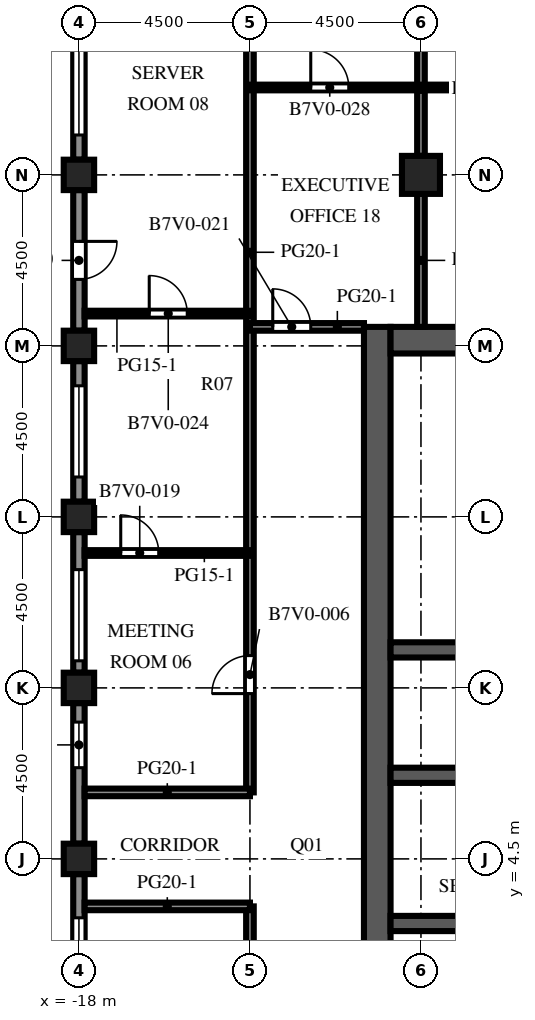
"""IFC4 building model, lengths in metres.
Left out: names, types, materials, properties, quantities, classifications, styles, units other than length and angle.
Written with IfcOpenShell. Run it as: python <this file> out.ifc"""

import sys

from ifc_helpers import new_model, si_unit, direction, frame, frame_2d, origin, origin_2d, place, context, subcontext, project, spatial, rectangle, extrude, element, fill, save


model = new_model("IFC4")
c1 = context("Model", 3, precision=1e-05, world=origin(), true_north=direction((0.0, 1.0)))
c2 = subcontext(c1, "Body", "Model", "MODEL_VIEW")
j1 = project(units=[si_unit("LENGTHUNIT", "METRE"), si_unit("PLANEANGLEUNIT", "RADIAN")], contexts=[c1])
p1 = place(None, origin())
s1 = spatial("IfcSite", under=j1, at=p1, CompositionType="ELEMENT")
p2 = place(p1, origin())
s2 = spatial("IfcBuilding", under=s1, at=p2, CompositionType="ELEMENT")
p3 = place(p2, frame((0.0, 0.0, 239.8)))
s3 = spatial("IfcBuildingStorey", under=s2, at=p3, CompositionType="ELEMENT", Elevation=239.8)
for number, where, z_axis, x_axis in (
    (1, (-18.0, 4.5, 0.0), (0.0, 0.0, 1.0), (1.0, 0.0, 0.0)),
    (2, (-18.0, 9.0, 0.0), (0.0, 0.0, 1.0), (1.0, 0.0, 0.0)),
    (3, (-18.0, 13.5, 0.0), (0.0, 0.0, 1.0), (1.0, 0.0, 0.0)),
    (4, (-18.0, 18.0, 0.0), (0.0, 0.0, 1.0), (1.0, 0.0, 0.0)),
    (5, (-18.0, 22.5, 0.0), (0.0, 0.0, 1.0), (1.0, 0.0, 0.0)),
):
    element("IfcColumn", number, at=place(p3, frame(where, z_axis=z_axis, x_axis=x_axis)), inside=s3, PredefinedType="COLUMN", context=c2, shape_type="SweptSolid", body=[
        extrude(rectangle(XDim=0.8, YDim=0.8, at=origin_2d()), origin(), (0.0, 0.0, 1.0), 4.1),
    ])
p4 = place(p3, frame((-9.0, 22.5, 0.0), z_axis=(0.0, 0.0, 1.0), x_axis=(1.0, 0.0, 0.0)))
e6 = element("IfcColumn", 6, at=p4, inside=s3, PredefinedType="COLUMN", context=c2, shape_type="SweptSolid", body=[
    extrude(rectangle(XDim=1.0, YDim=1.0, at=origin_2d()), origin(), (0.0, 0.0, 1.0), 4.1),
])
p5 = place(p3, frame((-10.15, -9.0, 0.0), z_axis=(0.0, 0.0, 1.0), x_axis=(0.0, 1.0, 0.0)))
e7 = element("IfcWall", 7, at=p5, inside=s3, PredefinedType="SHEAR", context=c2, shape_type="SweptSolid", body=[
    extrude(rectangle(XDim=27.5, YDim=0.7, at=frame_2d((13.75, 0.0))), origin(), (0.0, 0.0, 1.0), 4.1),
])
p6 = place(p5, frame((12.55, 0.0, 0.0)))
e8 = element("IfcOpeningElement", 8, at=p6, cuts=e7, PredefinedType="OPENING", context=c2, shape_type="SweptSolid", body=[
    extrude(rectangle(XDim=2.4, YDim=2.4, at=frame_2d((1.2, 1.2))), frame((0.0, 0.36, 0.0), z_axis=(0.0, -1.0, 0.0), x_axis=(1.0, 0.0, 0.0)), (0.0, 0.0, 1.0), 0.72),
])
p7 = place(p5, frame((6.825, 0.0, 0.0)))
e9 = element("IfcOpeningElement", 9, at=p7, cuts=e7, PredefinedType="OPENING", context=c2, shape_type="SweptSolid", body=[
    extrude(rectangle(XDim=1.2, YDim=2.1, at=frame_2d((0.6, 1.05))), frame((0.0, 0.36, 0.0), z_axis=(0.0, -1.0, 0.0), x_axis=(1.0, 0.0, 0.0)), (0.0, 0.0, 1.0), 0.72),
])
p8 = place(p5, frame((19.475, 0.0, 0.0)))
e10 = element("IfcOpeningElement", 10, at=p8, cuts=e7, PredefinedType="OPENING", context=c2, shape_type="SweptSolid", body=[
    extrude(rectangle(XDim=1.2, YDim=2.1, at=frame_2d((0.6, 1.05))), frame((0.0, 0.36, 0.0), z_axis=(0.0, -1.0, 0.0), x_axis=(1.0, 0.0, 0.0)), (0.0, 0.0, 1.0), 0.72),
])
p9 = place(p3, frame((-9.8, 18.15, 0.0), z_axis=(0.0, 0.0, 1.0), x_axis=(1.0, 0.0, 0.0)))
e11 = element("IfcWall", 11, at=p9, inside=s3, PredefinedType="SHEAR", context=c2, shape_type="SweptSolid", body=[
    extrude(rectangle(XDim=10.6, YDim=0.7, at=frame_2d((5.3, 0.0))), origin(), (0.0, 0.0, 1.0), 4.1),
])
p10 = place(p3, frame((-9.8, 2.8, 0.0), z_axis=(0.0, 0.0, 1.0), x_axis=(1.0, 0.0, 0.0)))
e12 = element("IfcWall", 12, at=p10, inside=s3, PredefinedType="SHEAR", context=c2, shape_type="SweptSolid", body=[
    extrude(rectangle(XDim=10.6, YDim=0.4, at=frame_2d((5.3, 0.0))), origin(), (0.0, 0.0, 1.0), 4.1),
])
p11 = place(p10, frame((0.688, 0.0, 0.0)))
e13 = element("IfcOpeningElement", 13, at=p11, cuts=e12, PredefinedType="OPENING", context=c2, shape_type="SweptSolid", body=[
    extrude(rectangle(XDim=1.1, YDim=2.1, at=frame_2d((0.55, 1.05))), frame((0.0, 0.21, 0.0), z_axis=(0.0, -1.0, 0.0), x_axis=(1.0, 0.0, 0.0)), (0.0, 0.0, 1.0), 0.42),
])
p12 = place(p10, frame((3.438, 0.0, 0.0)))
e14 = element("IfcOpeningElement", 14, at=p12, cuts=e12, PredefinedType="OPENING", context=c2, shape_type="SweptSolid", body=[
    extrude(rectangle(XDim=1.1, YDim=2.1, at=frame_2d((0.55, 1.05))), frame((0.0, 0.21, 0.0), z_axis=(0.0, -1.0, 0.0), x_axis=(1.0, 0.0, 0.0)), (0.0, 0.0, 1.0), 0.42),
])
p13 = place(p10, frame((6.113, 0.0, 0.0)))
e15 = element("IfcOpeningElement", 15, at=p13, cuts=e12, PredefinedType="OPENING", context=c2, shape_type="SweptSolid", body=[
    extrude(rectangle(XDim=1.0, YDim=2.1, at=frame_2d((0.5, 1.05))), frame((0.0, 0.21, 0.0), z_axis=(0.0, -1.0, 0.0), x_axis=(1.0, 0.0, 0.0)), (0.0, 0.0, 1.0), 0.42),
])
p14 = place(p10, frame((8.863, 0.0, 0.0)))
e16 = element("IfcOpeningElement", 16, at=p14, cuts=e12, PredefinedType="OPENING", context=c2, shape_type="SweptSolid", body=[
    extrude(rectangle(XDim=1.0, YDim=2.1, at=frame_2d((0.5, 1.05))), frame((0.0, 0.21, 0.0), z_axis=(0.0, -1.0, 0.0), x_axis=(1.0, 0.0, 0.0)), (0.0, 0.0, 1.0), 0.42),
])
p15 = place(p3, frame((-9.8, 6.7, 0.0), z_axis=(0.0, 0.0, 1.0), x_axis=(1.0, 0.0, 0.0)))
e17 = element("IfcWall", 17, at=p15, inside=s3, PredefinedType="SHEAR", context=c2, shape_type="SweptSolid", body=[
    extrude(rectangle(XDim=10.6, YDim=0.4, at=frame_2d((5.3, 0.0))), origin(), (0.0, 0.0, 1.0), 4.1),
])
p16 = place(p15, frame((3.438, 0.0, 0.0)))
e18 = element("IfcOpeningElement", 18, at=p16, cuts=e17, PredefinedType="OPENING", context=c2, shape_type="SweptSolid", body=[
    extrude(rectangle(XDim=1.1, YDim=2.1, at=frame_2d((0.55, 1.05))), frame((0.0, 0.21, 0.0), z_axis=(0.0, -1.0, 0.0), x_axis=(1.0, 0.0, 0.0)), (0.0, 0.0, 1.0), 0.42),
])
p17 = place(p15, frame((6.062, 0.0, 0.0)))
e19 = element("IfcOpeningElement", 19, at=p17, cuts=e17, PredefinedType="OPENING", context=c2, shape_type="SweptSolid", body=[
    extrude(rectangle(XDim=1.1, YDim=2.1, at=frame_2d((0.55, 1.05))), frame((0.0, 0.21, 0.0), z_axis=(0.0, -1.0, 0.0), x_axis=(1.0, 0.0, 0.0)), (0.0, 0.0, 1.0), 0.42),
])
p18 = place(p15, frame((8.812, 0.0, 0.0)))
e20 = element("IfcOpeningElement", 20, at=p18, cuts=e17, PredefinedType="OPENING", context=c2, shape_type="SweptSolid", body=[
    extrude(rectangle(XDim=1.1, YDim=2.1, at=frame_2d((0.55, 1.05))), frame((0.0, 0.21, 0.0), z_axis=(0.0, -1.0, 0.0), x_axis=(1.0, 0.0, 0.0)), (0.0, 0.0, 1.0), 0.42),
])
p19 = place(p15, frame((0.738, 0.0, 0.0)))
e21 = element("IfcOpeningElement", 21, at=p19, cuts=e17, PredefinedType="OPENING", context=c2, shape_type="SweptSolid", body=[
    extrude(rectangle(XDim=1.0, YDim=2.1, at=frame_2d((0.5, 1.05))), frame((0.0, 0.21, 0.0), z_axis=(0.0, -1.0, 0.0), x_axis=(1.0, 0.0, 0.0)), (0.0, 0.0, 1.0), 0.42),
])
p20 = place(p3, frame((-9.8, 10.0, 0.0), z_axis=(0.0, 0.0, 1.0), x_axis=(1.0, 0.0, 0.0)))
e22 = element("IfcWall", 22, at=p20, inside=s3, PredefinedType="SHEAR", context=c2, shape_type="SweptSolid", body=[
    extrude(rectangle(XDim=10.6, YDim=0.4, at=frame_2d((5.3, 0.0))), origin(), (0.0, 0.0, 1.0), 4.1),
])
p21 = place(p3, frame((-18.0, 22.9, 0.0), z_axis=(0.0, 0.0, 1.0), x_axis=(0.0, 1.0, 0.0)))
e23 = element("IfcWall", 23, at=p21, inside=s3, PredefinedType="SOLIDWALL", context=c2, shape_type="SweptSolid", body=[
    extrude(rectangle(XDim=3.7, YDim=0.3, at=frame_2d((1.85, 0.0))), origin(), (0.0, 0.0, 1.0), 2.85),
])
p22 = place(p21, frame((0.65, 0.0, 0.8)))
e24 = element("IfcOpeningElement", 24, at=p22, cuts=e23, PredefinedType="OPENING", context=c2, shape_type="SweptSolid", body=[
    extrude(rectangle(XDim=2.4, YDim=1.7, at=frame_2d((1.2, 0.85))), frame((0.0, 0.16, 0.0), z_axis=(0.0, -1.0, 0.0), x_axis=(1.0, 0.0, 0.0)), (0.0, 0.0, 1.0), 0.32),
])
p23 = place(p3, frame((-18.0, 18.4, 0.0), z_axis=(0.0, 0.0, 1.0), x_axis=(0.0, 1.0, 0.0)))
e25 = element("IfcWall", 25, at=p23, inside=s3, PredefinedType="SOLIDWALL", context=c2, shape_type="SweptSolid", body=[
    extrude(rectangle(XDim=3.7, YDim=0.3, at=frame_2d((1.85, 0.0))), origin(), (0.0, 0.0, 1.0), 2.85),
])
p24 = place(p23, frame((1.35, 0.0, 0.0)))
e26 = element("IfcOpeningElement", 26, at=p24, cuts=e25, PredefinedType="OPENING", context=c2, shape_type="SweptSolid", body=[
    extrude(rectangle(XDim=1.0, YDim=2.2, at=frame_2d((0.5, 1.1))), frame((0.0, 0.16, 0.0), z_axis=(0.0, -1.0, 0.0), x_axis=(1.0, 0.0, 0.0)), (0.0, 0.0, 1.0), 0.32),
])
p25 = place(p3, frame((-18.0, 13.9, 0.0), z_axis=(0.0, 0.0, 1.0), x_axis=(0.0, 1.0, 0.0)))
e27 = element("IfcWall", 27, at=p25, inside=s3, PredefinedType="SOLIDWALL", context=c2, shape_type="SweptSolid", body=[
    extrude(rectangle(XDim=3.7, YDim=0.3, at=frame_2d((1.85, 0.0))), origin(), (0.0, 0.0, 1.0), 2.85),
])
p26 = place(p25, frame((0.65, 0.0, 0.8)))
e28 = element("IfcOpeningElement", 28, at=p26, cuts=e27, PredefinedType="OPENING", context=c2, shape_type="SweptSolid", body=[
    extrude(rectangle(XDim=2.4, YDim=1.7, at=frame_2d((1.2, 0.85))), frame((0.0, 0.16, 0.0), z_axis=(0.0, -1.0, 0.0), x_axis=(1.0, 0.0, 0.0)), (0.0, 0.0, 1.0), 0.32),
])
p27 = place(p3, frame((-18.0, 9.4, 0.0), z_axis=(0.0, 0.0, 1.0), x_axis=(0.0, 1.0, 0.0)))
e29 = element("IfcWall", 29, at=p27, inside=s3, PredefinedType="SOLIDWALL", context=c2, shape_type="SweptSolid", body=[
    extrude(rectangle(XDim=3.7, YDim=0.3, at=frame_2d((1.85, 0.0))), origin(), (0.0, 0.0, 1.0), 2.85),
])
p28 = place(p27, frame((0.312, 0.0, 0.8)))
e30 = element("IfcOpeningElement", 30, at=p28, cuts=e29, PredefinedType="OPENING", context=c2, shape_type="SweptSolid", body=[
    extrude(rectangle(XDim=2.4, YDim=1.7, at=frame_2d((1.2, 0.85))), frame((0.0, 0.16, 0.0), z_axis=(0.0, -1.0, 0.0), x_axis=(1.0, 0.0, 0.0)), (0.0, 0.0, 1.0), 0.32),
])
p29 = place(p3, frame((-18.0, 4.9, 0.0), z_axis=(0.0, 0.0, 1.0), x_axis=(0.0, 1.0, 0.0)))
e31 = element("IfcWall", 31, at=p29, inside=s3, PredefinedType="SOLIDWALL", context=c2, shape_type="SweptSolid", body=[
    extrude(rectangle(XDim=3.7, YDim=0.3, at=frame_2d((1.85, 0.0))), origin(), (0.0, 0.0, 1.0), 2.85),
])
p30 = place(p29, frame((2.0, 0.0, 0.8)))
e32 = element("IfcOpeningElement", 32, at=p30, cuts=e31, PredefinedType="OPENING", context=c2, shape_type="SweptSolid", body=[
    extrude(rectangle(XDim=1.2, YDim=1.7, at=frame_2d((0.6, 0.85))), frame((0.0, 0.16, 0.0), z_axis=(0.0, -1.0, 0.0), x_axis=(1.0, 0.0, 0.0)), (0.0, 0.0, 1.0), 0.32),
])
p31 = place(p3, frame((-18.0, 0.4, 0.0), z_axis=(0.0, 0.0, 1.0), x_axis=(0.0, 1.0, 0.0)))
e33 = element("IfcWall", 33, at=p31, inside=s3, PredefinedType="SOLIDWALL", context=c2, shape_type="SweptSolid", body=[
    extrude(rectangle(XDim=3.7, YDim=0.3, at=frame_2d((1.85, 0.0))), origin(), (0.0, 0.0, 1.0), 2.85),
])
p32 = place(p31, frame((0.15, 0.0, 0.8)))
e34 = element("IfcOpeningElement", 34, at=p32, cuts=e33, PredefinedType="OPENING", context=c2, shape_type="SweptSolid", body=[
    extrude(rectangle(XDim=2.4, YDim=1.7, at=frame_2d((1.2, 0.85))), frame((0.0, 0.16, 0.0), z_axis=(0.0, -1.0, 0.0), x_axis=(1.0, 0.0, 0.0)), (0.0, 0.0, 1.0), 0.32),
])
p33 = place(p3, frame((-13.5, -22.077, 0.0), z_axis=(0.0, 0.0, 1.0), x_axis=(0.0, 1.0, 0.0)))
e35 = element("IfcWall", 35, at=p33, inside=s3, PredefinedType="PARTITIONING", context=c2, shape_type="SweptSolid", body=[
    extrude(rectangle(XDim=25.327, YDim=0.2, at=frame_2d((12.664, 0.0))), origin(), (0.0, 0.0, 1.0), 3.65),
])
p34 = place(p33, frame((22.627, 0.0, 0.0)))
e36 = element("IfcOpeningElement", 36, at=p34, cuts=e35, PredefinedType="OPENING", context=c2, shape_type="SweptSolid", body=[
    extrude(rectangle(XDim=1.0, YDim=2.1, at=frame_2d((0.5, 1.05))), frame((0.0, 0.11, 0.0), z_axis=(0.0, -1.0, 0.0), x_axis=(1.0, 0.0, 0.0)), (0.0, 0.0, 1.0), 0.22),
])
p35 = place(p3, frame((-13.5, 6.25, 0.0), z_axis=(0.0, 0.0, 1.0), x_axis=(0.0, 1.0, 0.0)))
e37 = element("IfcWall", 37, at=p35, inside=s3, PredefinedType="PARTITIONING", context=c2, shape_type="SweptSolid", body=[
    extrude(rectangle(XDim=24.827, YDim=0.2, at=frame_2d((12.414, 0.0))), origin(), (0.0, 0.0, 1.0), 3.65),
])
p36 = place(p35, frame((2.6, 0.0, 0.0)))
e38 = element("IfcOpeningElement", 38, at=p36, cuts=e37, PredefinedType="OPENING", context=c2, shape_type="SweptSolid", body=[
    extrude(rectangle(XDim=1.0, YDim=2.1, at=frame_2d((0.5, 1.05))), frame((0.0, 0.11, 0.0), z_axis=(0.0, -1.0, 0.0), x_axis=(1.0, 0.0, 0.0)), (0.0, 0.0, 1.0), 0.22),
])
for number, where, z_axis, x_axis in (
    (39, (-9.0, 18.5, 0.0), (0.0, 0.0, 1.0), (0.0, 1.0, 0.0)),
    (40, (-9.0, 23.0, 0.0), (0.0, 0.0, 1.0), (0.0, 1.0, 0.0)),
):
    element("IfcWall", number, at=place(p3, frame(where, z_axis=z_axis, x_axis=x_axis)), inside=s3, PredefinedType="PARTITIONING", context=c2, shape_type="SweptSolid", body=[
        extrude(rectangle(XDim=3.5, YDim=0.2, at=frame_2d((1.75, 0.0))), origin(), (0.0, 0.0, 1.0), 3.65),
    ])
for number, where, z_axis, x_axis in (
    (41, (-17.85, 3.25, 0.0), (0.0, 0.0, 1.0), (1.0, 0.0, 0.0)),
    (42, (-17.85, 6.25, 0.0), (0.0, 0.0, 1.0), (1.0, 0.0, 0.0)),
):
    element("IfcWall", number, at=place(p3, frame(where, z_axis=z_axis, x_axis=x_axis)), inside=s3, PredefinedType="PARTITIONING", context=c2, shape_type="SweptSolid", body=[
        extrude(rectangle(XDim=4.35, YDim=0.2, at=frame_2d((2.175, 0.0))), origin(), (0.0, 0.0, 1.0), 3.65),
    ])
p37 = place(p3, frame((-17.85, 12.55, 0.0), z_axis=(0.0, 0.0, 1.0), x_axis=(1.0, 0.0, 0.0)))
e43 = element("IfcWall", 43, at=p37, inside=s3, PredefinedType="PARTITIONING", context=c2, shape_type="SweptSolid", body=[
    extrude(rectangle(XDim=4.35, YDim=0.15, at=frame_2d((2.175, 0.0))), origin(), (0.0, 0.0, 1.0), 3.65),
])
p38 = place(p37, frame((0.95, 0.0, 0.0)))
e44 = element("IfcOpeningElement", 44, at=p38, cuts=e43, PredefinedType="OPENING", context=c2, shape_type="SweptSolid", body=[
    extrude(rectangle(XDim=1.0, YDim=2.1, at=frame_2d((0.5, 1.05))), frame((0.0, 0.085, 0.0), z_axis=(0.0, -1.0, 0.0), x_axis=(1.0, 0.0, 0.0)), (0.0, 0.0, 1.0), 0.17),
])
p39 = place(p3, frame((-13.5, 18.5, 0.0), z_axis=(0.0, 0.0, 1.0), x_axis=(1.0, 0.0, 0.0)))
e45 = element("IfcWall", 45, at=p39, inside=s3, PredefinedType="PARTITIONING", context=c2, shape_type="SweptSolid", body=[
    extrude(rectangle(XDim=3.0, YDim=0.2, at=frame_2d((1.5, 0.0))), origin(), (0.0, 0.0, 1.0), 3.65),
])
p40 = place(p39, frame((0.6, 0.0, 0.0)))
e46 = element("IfcOpeningElement", 46, at=p40, cuts=e45, PredefinedType="OPENING", context=c2, shape_type="SweptSolid", body=[
    extrude(rectangle(XDim=1.0, YDim=2.1, at=frame_2d((0.5, 1.05))), frame((0.0, 0.11, 0.0), z_axis=(0.0, -1.0, 0.0), x_axis=(1.0, 0.0, 0.0)), (0.0, 0.0, 1.0), 0.22),
])
p41 = place(p3, frame((-17.85, 18.85, 0.0), z_axis=(0.0, 0.0, 1.0), x_axis=(1.0, 0.0, 0.0)))
e47 = element("IfcWall", 47, at=p41, inside=s3, PredefinedType="PARTITIONING", context=c2, shape_type="SweptSolid", body=[
    extrude(rectangle(XDim=4.35, YDim=0.15, at=frame_2d((2.175, 0.0))), origin(), (0.0, 0.0, 1.0), 3.65),
])
p42 = place(p41, frame((1.7, 0.0, 0.0)))
e48 = element("IfcOpeningElement", 48, at=p42, cuts=e47, PredefinedType="OPENING", context=c2, shape_type="SweptSolid", body=[
    extrude(rectangle(XDim=1.0, YDim=2.1, at=frame_2d((0.5, 1.05))), frame((0.0, 0.085, 0.0), z_axis=(0.0, -1.0, 0.0), x_axis=(1.0, 0.0, 0.0)), (0.0, 0.0, 1.0), 0.17),
])
p43 = place(p3, frame((-13.5, 24.8, 0.0), z_axis=(0.0, 0.0, 1.0), x_axis=(1.0, 0.0, 0.0)))
e49 = element("IfcWall", 49, at=p43, inside=s3, PredefinedType="PARTITIONING", context=c2, shape_type="SweptSolid", body=[
    extrude(rectangle(XDim=34.5, YDim=0.15, at=frame_2d((17.25, 0.0))), origin(), (0.0, 0.0, 1.0), 3.65),
])
p44 = place(p43, frame((1.6, 0.0, 0.0)))
e50 = element("IfcOpeningElement", 50, at=p44, cuts=e49, PredefinedType="OPENING", context=c2, shape_type="SweptSolid", body=[
    extrude(rectangle(XDim=1.0, YDim=2.1, at=frame_2d((0.5, 1.05))), frame((0.0, 0.085, 0.0), z_axis=(0.0, -1.0, 0.0), x_axis=(1.0, 0.0, 0.0)), (0.0, 0.0, 1.0), 0.17),
])
p45 = place(p43, frame((10.35, 0.0, 0.0)))
e51 = element("IfcOpeningElement", 51, at=p45, cuts=e49, PredefinedType="OPENING", context=c2, shape_type="SweptSolid", body=[
    extrude(rectangle(XDim=1.0, YDim=2.1, at=frame_2d((0.5, 1.05))), frame((0.0, 0.085, 0.0), z_axis=(0.0, -1.0, 0.0), x_axis=(1.0, 0.0, 0.0)), (0.0, 0.0, 1.0), 0.17),
])
p46 = place(p43, frame((22.35, 0.0, 0.0)))
e52 = element("IfcOpeningElement", 52, at=p46, cuts=e49, PredefinedType="OPENING", context=c2, shape_type="SweptSolid", body=[
    extrude(rectangle(XDim=1.0, YDim=2.1, at=frame_2d((0.5, 1.05))), frame((0.0, 0.085, 0.0), z_axis=(0.0, -1.0, 0.0), x_axis=(1.0, 0.0, 0.0)), (0.0, 0.0, 1.0), 0.17),
])
p47 = place(p43, frame((31.1, 0.0, 0.0)))
e53 = element("IfcOpeningElement", 53, at=p47, cuts=e49, PredefinedType="OPENING", context=c2, shape_type="SweptSolid", body=[
    extrude(rectangle(XDim=1.0, YDim=2.1, at=frame_2d((0.5, 1.05))), frame((0.0, 0.085, 0.0), z_axis=(0.0, -1.0, 0.0), x_axis=(1.0, 0.0, 0.0)), (0.0, 0.0, 1.0), 0.17),
])
p48 = place(p22, origin())
e54 = element("IfcWindow", 54, at=p48, inside=s3, PartitioningType="SINGLE_PANEL", PredefinedType="WINDOW", context=c2, shape_type="SweptSolid", body=[
    extrude(rectangle(XDim=2.4, YDim=1.7, at=frame_2d((1.2, 0.85))), frame((0.0, 0.03, 0.0), z_axis=(0.0, -1.0, 0.0), x_axis=(1.0, 0.0, 0.0)), (0.0, 0.0, 1.0), 0.06),
])
fill(e24, e54)
p49 = place(p24, origin())
e55 = element("IfcDoor", 55, at=p49, inside=s3, OperationType="SINGLE_SWING_RIGHT", PredefinedType="DOOR", context=c2, shape_type="SweptSolid", body=[
    extrude(rectangle(XDim=1.0, YDim=2.2, at=frame_2d((0.5, 1.1))), frame((0.0, 0.025, 0.0), z_axis=(0.0, -1.0, 0.0), x_axis=(1.0, 0.0, 0.0)), (0.0, 0.0, 1.0), 0.05),
])
fill(e26, e55)
p50 = place(p26, origin())
e56 = element("IfcWindow", 56, at=p50, inside=s3, PartitioningType="SINGLE_PANEL", PredefinedType="WINDOW", context=c2, shape_type="SweptSolid", body=[
    extrude(rectangle(XDim=2.4, YDim=1.7, at=frame_2d((1.2, 0.85))), frame((0.0, 0.03, 0.0), z_axis=(0.0, -1.0, 0.0), x_axis=(1.0, 0.0, 0.0)), (0.0, 0.0, 1.0), 0.06),
])
fill(e28, e56)
p51 = place(p28, origin())
e57 = element("IfcWindow", 57, at=p51, inside=s3, PartitioningType="SINGLE_PANEL", PredefinedType="WINDOW", context=c2, shape_type="SweptSolid", body=[
    extrude(rectangle(XDim=2.4, YDim=1.7, at=frame_2d((1.2, 0.85))), frame((0.0, 0.03, 0.0), z_axis=(0.0, -1.0, 0.0), x_axis=(1.0, 0.0, 0.0)), (0.0, 0.0, 1.0), 0.06),
])
fill(e30, e57)
p52 = place(p30, origin())
e58 = element("IfcWindow", 58, at=p52, inside=s3, PartitioningType="SINGLE_PANEL", PredefinedType="WINDOW", context=c2, shape_type="SweptSolid", body=[
    extrude(rectangle(XDim=1.2, YDim=1.7, at=frame_2d((0.6, 0.85))), frame((0.0, 0.03, 0.0), z_axis=(0.0, -1.0, 0.0), x_axis=(1.0, 0.0, 0.0)), (0.0, 0.0, 1.0), 0.06),
])
fill(e32, e58)
p53 = place(p32, origin())
e59 = element("IfcWindow", 59, at=p53, inside=s3, PartitioningType="SINGLE_PANEL", PredefinedType="WINDOW", context=c2, shape_type="SweptSolid", body=[
    extrude(rectangle(XDim=2.4, YDim=1.7, at=frame_2d((1.2, 0.85))), frame((0.0, 0.03, 0.0), z_axis=(0.0, -1.0, 0.0), x_axis=(1.0, 0.0, 0.0)), (0.0, 0.0, 1.0), 0.06),
])
fill(e34, e59)
p54 = place(p11, origin())
e60 = element("IfcDoor", 60, at=p54, inside=s3, OperationType="DOUBLE_DOOR_SLIDING", PredefinedType="DOOR", context=c2, shape_type="SweptSolid", body=[
    extrude(rectangle(XDim=1.1, YDim=2.1, at=frame_2d((0.55, 1.05))), frame((0.0, 0.025, 0.0), z_axis=(0.0, -1.0, 0.0), x_axis=(1.0, 0.0, 0.0)), (0.0, 0.0, 1.0), 0.05),
])
fill(e13, e60)
p55 = place(p6, origin())
e61 = element("IfcDoor", 61, at=p55, inside=s3, OperationType="DOUBLE_DOOR_DOUBLE_SWING", PredefinedType="DOOR", context=c2, shape_type="SweptSolid", body=[
    extrude(rectangle(XDim=2.4, YDim=2.4, at=frame_2d((1.2, 1.2))), frame((0.0, 0.025, 0.0), z_axis=(0.0, -1.0, 0.0), x_axis=(1.0, 0.0, 0.0)), (0.0, 0.0, 1.0), 0.05),
])
fill(e8, e61)
p56 = place(p8, origin())
e62 = element("IfcDoor", 62, at=p56, inside=s3, OperationType="SINGLE_SWING_LEFT", PredefinedType="DOOR", context=c2, shape_type="SweptSolid", body=[
    extrude(rectangle(XDim=1.2, YDim=2.1, at=frame_2d((0.6, 1.05))), frame((0.0, 0.025, 0.0), z_axis=(0.0, -1.0, 0.0), x_axis=(1.0, 0.0, 0.0)), (0.0, 0.0, 1.0), 0.05),
])
fill(e10, e62)
p57 = place(p19, origin())
e63 = element("IfcDoor", 63, at=p57, inside=s3, OperationType="SINGLE_SWING_LEFT", PredefinedType="DOOR", context=c2, shape_type="SweptSolid", body=[
    extrude(rectangle(XDim=1.0, YDim=2.1, at=frame_2d((0.5, 1.05))), frame((0.0, 0.025, 0.0), z_axis=(0.0, -1.0, 0.0), x_axis=(1.0, 0.0, 0.0)), (0.0, 0.0, 1.0), 0.05),
])
fill(e21, e63)
p58 = place(p36, origin())
e64 = element("IfcDoor", 64, at=p58, inside=s3, OperationType="SINGLE_SWING_LEFT", PredefinedType="DOOR", context=c2, shape_type="SweptSolid", body=[
    extrude(rectangle(XDim=1.0, YDim=2.1, at=frame_2d((0.5, 1.05))), frame((0.0, 0.025, 0.0), z_axis=(0.0, -1.0, 0.0), x_axis=(1.0, 0.0, 0.0)), (0.0, 0.0, 1.0), 0.05),
])
fill(e38, e64)
p59 = place(p38, origin())
e65 = element("IfcDoor", 65, at=p59, inside=s3, OperationType="SINGLE_SWING_LEFT", PredefinedType="DOOR", context=c2, shape_type="SweptSolid", body=[
    extrude(rectangle(XDim=1.0, YDim=2.1, at=frame_2d((0.5, 1.05))), frame((0.0, 0.025, 0.0), z_axis=(0.0, -1.0, 0.0), x_axis=(1.0, 0.0, 0.0)), (0.0, 0.0, 1.0), 0.05),
])
fill(e44, e65)
p60 = place(p40, origin())
e66 = element("IfcDoor", 66, at=p60, inside=s3, OperationType="SINGLE_SWING_LEFT", PredefinedType="DOOR", context=c2, shape_type="SweptSolid", body=[
    extrude(rectangle(XDim=1.0, YDim=2.1, at=frame_2d((0.5, 1.05))), frame((0.0, 0.025, 0.0), z_axis=(0.0, -1.0, 0.0), x_axis=(1.0, 0.0, 0.0)), (0.0, 0.0, 1.0), 0.05),
])
fill(e46, e66)
p61 = place(p42, origin())
e67 = element("IfcDoor", 67, at=p61, inside=s3, OperationType="SINGLE_SWING_LEFT", PredefinedType="DOOR", context=c2, shape_type="SweptSolid", body=[
    extrude(rectangle(XDim=1.0, YDim=2.1, at=frame_2d((0.5, 1.05))), frame((0.0, 0.025, 0.0), z_axis=(0.0, -1.0, 0.0), x_axis=(1.0, 0.0, 0.0)), (0.0, 0.0, 1.0), 0.05),
])
fill(e48, e67)
p62 = place(p44, origin())
e68 = element("IfcDoor", 68, at=p62, inside=s3, OperationType="SINGLE_SWING_LEFT", PredefinedType="DOOR", context=c2, shape_type="SweptSolid", body=[
    extrude(rectangle(XDim=1.0, YDim=2.1, at=frame_2d((0.5, 1.05))), frame((0.0, 0.025, 0.0), z_axis=(0.0, -1.0, 0.0), x_axis=(1.0, 0.0, 0.0)), (0.0, 0.0, 1.0), 0.05),
])
fill(e50, e68)
save(model, sys.argv[1])
